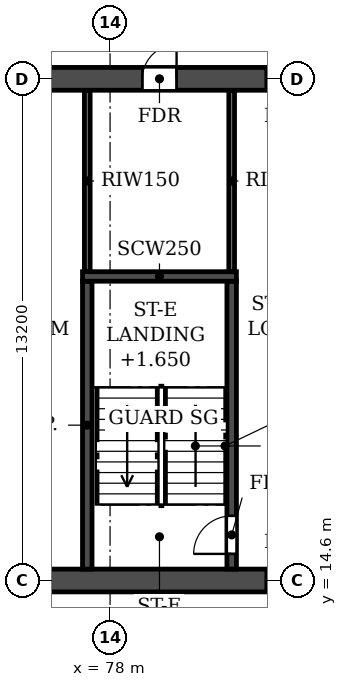
"""IFC4 building model, lengths in metres.
Left out: names, types, materials, properties, quantities, classifications, styles, units other than length and angle.
Written with IfcOpenShell. Run it as: python <this file> out.ifc"""

import sys

from ifc_helpers import new_model, si_unit, direction, frame, frame_2d, origin, place, context, subcontext, project, spatial, rectangle, extrude, element, fill, save


model = new_model("IFC4")
c1 = context("Model", 3, precision=1e-05, world=origin(), true_north=direction((0.0, 1.0)))
c2 = subcontext(c1, "Body", "Model", "MODEL_VIEW")
j1 = project(units=[si_unit("LENGTHUNIT", "METRE"), si_unit("PLANEANGLEUNIT", "RADIAN")], contexts=[c1])
p1 = place(None, origin())
s1 = spatial("IfcSite", under=j1, at=p1, CompositionType="ELEMENT")
p2 = place(p1, origin())
s2 = spatial("IfcBuilding", under=s1, at=p2, CompositionType="ELEMENT")
p3 = place(p2, frame((0.0, 0.0, 63.0)))
s3 = spatial("IfcBuildingStorey", under=s2, at=p3, CompositionType="ELEMENT", Elevation=63.0)
p4 = place(p3, frame((8.6, 14.6, 0.0), z_axis=(0.0, 0.0, 1.0), x_axis=(1.0, 0.0, 0.0)))
e1 = element("IfcWall", 1, at=p4, inside=s3, PredefinedType="SOLIDWALL", context=c2, shape_type="SweptSolid", body=[
    extrude(rectangle(XDim=84.8, YDim=0.6, at=frame_2d((42.4, 0.0))), origin(), (0.0, 0.0, 1.0), 2.95),
])
p5 = place(p4, frame((1.35, 0.0, 0.0)))
e2 = element("IfcOpeningElement", 2, at=p5, cuts=e1, PredefinedType="OPENING", context=c2, shape_type="SweptSolid", body=[
    extrude(rectangle(XDim=1.0, YDim=2.1, at=frame_2d((0.5, 1.05))), frame((0.0, 0.31, 0.0), z_axis=(0.0, -1.0, 0.0), x_axis=(1.0, 0.0, 0.0)), (0.0, 0.0, 1.0), 0.62),
])
p6 = place(p4, frame((6.05, 0.0, 0.0)))
e3 = element("IfcOpeningElement", 3, at=p6, cuts=e1, PredefinedType="OPENING", context=c2, shape_type="SweptSolid", body=[
    extrude(rectangle(XDim=1.0, YDim=2.1, at=frame_2d((0.5, 1.05))), frame((0.0, 0.31, 0.0), z_axis=(0.0, -1.0, 0.0), x_axis=(1.0, 0.0, 0.0)), (0.0, 0.0, 1.0), 0.62),
])
p7 = place(p4, frame((10.3, 0.0, 0.0)))
e4 = element("IfcOpeningElement", 4, at=p7, cuts=e1, PredefinedType="OPENING", context=c2, shape_type="SweptSolid", body=[
    extrude(rectangle(XDim=1.0, YDim=2.1, at=frame_2d((0.5, 1.05))), frame((0.0, 0.31, 0.0), z_axis=(0.0, -1.0, 0.0), x_axis=(1.0, 0.0, 0.0)), (0.0, 0.0, 1.0), 0.62),
])
p8 = place(p4, frame((18.2, 0.0, 0.0)))
e5 = element("IfcOpeningElement", 5, at=p8, cuts=e1, PredefinedType="OPENING", context=c2, shape_type="SweptSolid", body=[
    extrude(rectangle(XDim=1.0, YDim=2.1, at=frame_2d((0.5, 1.05))), frame((0.0, 0.31, 0.0), z_axis=(0.0, -1.0, 0.0), x_axis=(1.0, 0.0, 0.0)), (0.0, 0.0, 1.0), 0.62),
])
p9 = place(p4, frame((22.8, 0.0, 0.0)))
e6 = element("IfcOpeningElement", 6, at=p9, cuts=e1, PredefinedType="OPENING", context=c2, shape_type="SweptSolid", body=[
    extrude(rectangle(XDim=1.0, YDim=2.1, at=frame_2d((0.5, 1.05))), frame((0.0, 0.31, 0.0), z_axis=(0.0, -1.0, 0.0), x_axis=(1.0, 0.0, 0.0)), (0.0, 0.0, 1.0), 0.62),
])
p10 = place(p4, frame((35.4, 0.0, 0.0)))
e7 = element("IfcOpeningElement", 7, at=p10, cuts=e1, PredefinedType="OPENING", context=c2, shape_type="SweptSolid", body=[
    extrude(rectangle(XDim=1.0, YDim=2.1, at=frame_2d((0.5, 1.05))), frame((0.0, 0.31, 0.0), z_axis=(0.0, -1.0, 0.0), x_axis=(1.0, 0.0, 0.0)), (0.0, 0.0, 1.0), 0.62),
])
p11 = place(p4, frame((39.3, 0.0, 0.0)))
e8 = element("IfcOpeningElement", 8, at=p11, cuts=e1, PredefinedType="OPENING", context=c2, shape_type="SweptSolid", body=[
    extrude(rectangle(XDim=1.0, YDim=2.1, at=frame_2d((0.5, 1.05))), frame((0.0, 0.31, 0.0), z_axis=(0.0, -1.0, 0.0), x_axis=(1.0, 0.0, 0.0)), (0.0, 0.0, 1.0), 0.62),
])
p12 = place(p4, frame((41.9, 0.0, 0.0)))
e9 = element("IfcOpeningElement", 9, at=p12, cuts=e1, PredefinedType="OPENING", context=c2, shape_type="SweptSolid", body=[
    extrude(rectangle(XDim=1.0, YDim=2.1, at=frame_2d((0.5, 1.05))), frame((0.0, 0.31, 0.0), z_axis=(0.0, -1.0, 0.0), x_axis=(1.0, 0.0, 0.0)), (0.0, 0.0, 1.0), 0.62),
])
p13 = place(p4, frame((47.1, 0.0, 0.0)))
e10 = element("IfcOpeningElement", 10, at=p13, cuts=e1, PredefinedType="OPENING", context=c2, shape_type="SweptSolid", body=[
    extrude(rectangle(XDim=1.0, YDim=2.1, at=frame_2d((0.5, 1.05))), frame((0.0, 0.31, 0.0), z_axis=(0.0, -1.0, 0.0), x_axis=(1.0, 0.0, 0.0)), (0.0, 0.0, 1.0), 0.62),
])
p14 = place(p4, frame((61.0, 0.0, 0.0)))
e11 = element("IfcOpeningElement", 11, at=p14, cuts=e1, PredefinedType="OPENING", context=c2, shape_type="SweptSolid", body=[
    extrude(rectangle(XDim=1.0, YDim=2.1, at=frame_2d((0.5, 1.05))), frame((0.0, 0.31, 0.0), z_axis=(0.0, -1.0, 0.0), x_axis=(1.0, 0.0, 0.0)), (0.0, 0.0, 1.0), 0.62),
])
p15 = place(p4, frame((65.6, 0.0, 0.0)))
e12 = element("IfcOpeningElement", 12, at=p15, cuts=e1, PredefinedType="OPENING", context=c2, shape_type="SweptSolid", body=[
    extrude(rectangle(XDim=1.0, YDim=2.1, at=frame_2d((0.5, 1.05))), frame((0.0, 0.31, 0.0), z_axis=(0.0, -1.0, 0.0), x_axis=(1.0, 0.0, 0.0)), (0.0, 0.0, 1.0), 0.62),
])
p16 = place(p4, frame((73.5, 0.0, 0.0)))
e13 = element("IfcOpeningElement", 13, at=p16, cuts=e1, PredefinedType="OPENING", context=c2, shape_type="SweptSolid", body=[
    extrude(rectangle(XDim=1.0, YDim=2.1, at=frame_2d((0.5, 1.05))), frame((0.0, 0.31, 0.0), z_axis=(0.0, -1.0, 0.0), x_axis=(1.0, 0.0, 0.0)), (0.0, 0.0, 1.0), 0.62),
])
p17 = place(p4, frame((77.9, 0.0, 0.0)))
e14 = element("IfcOpeningElement", 14, at=p17, cuts=e1, PredefinedType="OPENING", context=c2, shape_type="SweptSolid", body=[
    extrude(rectangle(XDim=1.0, YDim=2.1, at=frame_2d((0.5, 1.05))), frame((0.0, 0.31, 0.0), z_axis=(0.0, -1.0, 0.0), x_axis=(1.0, 0.0, 0.0)), (0.0, 0.0, 1.0), 0.62),
])
p18 = place(p4, frame((82.6, 0.0, 0.0)))
e15 = element("IfcOpeningElement", 15, at=p18, cuts=e1, PredefinedType="OPENING", context=c2, shape_type="SweptSolid", body=[
    extrude(rectangle(XDim=1.0, YDim=2.1, at=frame_2d((0.5, 1.05))), frame((0.0, 0.31, 0.0), z_axis=(0.0, -1.0, 0.0), x_axis=(1.0, 0.0, 0.0)), (0.0, 0.0, 1.0), 0.62),
])
p19 = place(p3, frame((8.6, 27.8, 0.0), z_axis=(0.0, 0.0, 1.0), x_axis=(1.0, 0.0, 0.0)))
e16 = element("IfcWall", 16, at=p19, inside=s3, PredefinedType="SOLIDWALL", context=c2, shape_type="SweptSolid", body=[
    extrude(rectangle(XDim=84.8, YDim=0.6, at=frame_2d((42.4, 0.0))), origin(), (0.0, 0.0, 1.0), 2.95),
])
p20 = place(p19, frame((1.2, 0.0, 0.0)))
e17 = element("IfcOpeningElement", 17, at=p20, cuts=e16, PredefinedType="OPENING", context=c2, shape_type="SweptSolid", body=[
    extrude(rectangle(XDim=1.0, YDim=2.1, at=frame_2d((0.5, 1.05))), frame((0.0, 0.31, 0.0), z_axis=(0.0, -1.0, 0.0), x_axis=(1.0, 0.0, 0.0)), (0.0, 0.0, 1.0), 0.62),
])
p21 = place(p19, frame((5.9, 0.0, 0.0)))
e18 = element("IfcOpeningElement", 18, at=p21, cuts=e16, PredefinedType="OPENING", context=c2, shape_type="SweptSolid", body=[
    extrude(rectangle(XDim=1.0, YDim=2.1, at=frame_2d((0.5, 1.05))), frame((0.0, 0.31, 0.0), z_axis=(0.0, -1.0, 0.0), x_axis=(1.0, 0.0, 0.0)), (0.0, 0.0, 1.0), 0.62),
])
p22 = place(p19, frame((10.3, 0.0, 0.0)))
e19 = element("IfcOpeningElement", 19, at=p22, cuts=e16, PredefinedType="OPENING", context=c2, shape_type="SweptSolid", body=[
    extrude(rectangle(XDim=1.0, YDim=2.1, at=frame_2d((0.5, 1.05))), frame((0.0, 0.31, 0.0), z_axis=(0.0, -1.0, 0.0), x_axis=(1.0, 0.0, 0.0)), (0.0, 0.0, 1.0), 0.62),
])
p23 = place(p19, frame((13.65, 0.0, 0.0)))
e20 = element("IfcOpeningElement", 20, at=p23, cuts=e16, PredefinedType="OPENING", context=c2, shape_type="SweptSolid", body=[
    extrude(rectangle(XDim=0.9, YDim=2.1, at=frame_2d((0.45, 1.05))), frame((0.0, 0.31, 0.0), z_axis=(0.0, -1.0, 0.0), x_axis=(1.0, 0.0, 0.0)), (0.0, 0.0, 1.0), 0.62),
])
p24 = place(p19, frame((22.85, 0.0, 0.0)))
e21 = element("IfcOpeningElement", 21, at=p24, cuts=e16, PredefinedType="OPENING", context=c2, shape_type="SweptSolid", body=[
    extrude(rectangle(XDim=0.9, YDim=2.1, at=frame_2d((0.45, 1.05))), frame((0.0, 0.31, 0.0), z_axis=(0.0, -1.0, 0.0), x_axis=(1.0, 0.0, 0.0)), (0.0, 0.0, 1.0), 0.62),
])
p25 = place(p19, frame((27.3, 0.0, 0.0)))
e22 = element("IfcOpeningElement", 22, at=p25, cuts=e16, PredefinedType="OPENING", context=c2, shape_type="SweptSolid", body=[
    extrude(rectangle(XDim=1.0, YDim=2.1, at=frame_2d((0.5, 1.05))), frame((0.0, 0.31, 0.0), z_axis=(0.0, -1.0, 0.0), x_axis=(1.0, 0.0, 0.0)), (0.0, 0.0, 1.0), 0.62),
])
p26 = place(p19, frame((32.5, 0.0, 0.0)))
e23 = element("IfcOpeningElement", 23, at=p26, cuts=e16, PredefinedType="OPENING", context=c2, shape_type="SweptSolid", body=[
    extrude(rectangle(XDim=1.0, YDim=2.1, at=frame_2d((0.5, 1.05))), frame((0.0, 0.31, 0.0), z_axis=(0.0, -1.0, 0.0), x_axis=(1.0, 0.0, 0.0)), (0.0, 0.0, 1.0), 0.62),
])
p27 = place(p19, frame((39.0, 0.0, 0.0)))
e24 = element("IfcOpeningElement", 24, at=p27, cuts=e16, PredefinedType="OPENING", context=c2, shape_type="SweptSolid", body=[
    extrude(rectangle(XDim=1.0, YDim=2.1, at=frame_2d((0.5, 1.05))), frame((0.0, 0.31, 0.0), z_axis=(0.0, -1.0, 0.0), x_axis=(1.0, 0.0, 0.0)), (0.0, 0.0, 1.0), 0.62),
])
p28 = place(p19, frame((41.9, 0.0, 0.0)))
e25 = element("IfcOpeningElement", 25, at=p28, cuts=e16, PredefinedType="OPENING", context=c2, shape_type="SweptSolid", body=[
    extrude(rectangle(XDim=1.0, YDim=2.1, at=frame_2d((0.5, 1.05))), frame((0.0, 0.31, 0.0), z_axis=(0.0, -1.0, 0.0), x_axis=(1.0, 0.0, 0.0)), (0.0, 0.0, 1.0), 0.62),
])
p29 = place(p19, frame((47.4, 0.0, 0.0)))
e26 = element("IfcOpeningElement", 26, at=p29, cuts=e16, PredefinedType="OPENING", context=c2, shape_type="SweptSolid", body=[
    extrude(rectangle(XDim=1.0, YDim=2.1, at=frame_2d((0.5, 1.05))), frame((0.0, 0.31, 0.0), z_axis=(0.0, -1.0, 0.0), x_axis=(1.0, 0.0, 0.0)), (0.0, 0.0, 1.0), 0.62),
])
p30 = place(p19, frame((53.9, 0.0, 0.0)))
e27 = element("IfcOpeningElement", 27, at=p30, cuts=e16, PredefinedType="OPENING", context=c2, shape_type="SweptSolid", body=[
    extrude(rectangle(XDim=1.0, YDim=2.1, at=frame_2d((0.5, 1.05))), frame((0.0, 0.31, 0.0), z_axis=(0.0, -1.0, 0.0), x_axis=(1.0, 0.0, 0.0)), (0.0, 0.0, 1.0), 0.62),
])
p31 = place(p19, frame((57.8, 0.0, 0.0)))
e28 = element("IfcOpeningElement", 28, at=p31, cuts=e16, PredefinedType="OPENING", context=c2, shape_type="SweptSolid", body=[
    extrude(rectangle(XDim=1.0, YDim=2.1, at=frame_2d((0.5, 1.05))), frame((0.0, 0.31, 0.0), z_axis=(0.0, -1.0, 0.0), x_axis=(1.0, 0.0, 0.0)), (0.0, 0.0, 1.0), 0.62),
])
p32 = place(p19, frame((61.05, 0.0, 0.0)))
e29 = element("IfcOpeningElement", 29, at=p32, cuts=e16, PredefinedType="OPENING", context=c2, shape_type="SweptSolid", body=[
    extrude(rectangle(XDim=0.9, YDim=2.1, at=frame_2d((0.45, 1.05))), frame((0.0, 0.31, 0.0), z_axis=(0.0, -1.0, 0.0), x_axis=(1.0, 0.0, 0.0)), (0.0, 0.0, 1.0), 0.62),
])
p33 = place(p19, frame((70.25, 0.0, 0.0)))
e30 = element("IfcOpeningElement", 30, at=p33, cuts=e16, PredefinedType="OPENING", context=c2, shape_type="SweptSolid", body=[
    extrude(rectangle(XDim=0.9, YDim=2.1, at=frame_2d((0.45, 1.05))), frame((0.0, 0.31, 0.0), z_axis=(0.0, -1.0, 0.0), x_axis=(1.0, 0.0, 0.0)), (0.0, 0.0, 1.0), 0.62),
])
p34 = place(p19, frame((73.5, 0.0, 0.0)))
e31 = element("IfcOpeningElement", 31, at=p34, cuts=e16, PredefinedType="OPENING", context=c2, shape_type="SweptSolid", body=[
    extrude(rectangle(XDim=1.0, YDim=2.1, at=frame_2d((0.5, 1.05))), frame((0.0, 0.31, 0.0), z_axis=(0.0, -1.0, 0.0), x_axis=(1.0, 0.0, 0.0)), (0.0, 0.0, 1.0), 0.62),
])
p35 = place(p19, frame((77.75, 0.0, 0.0)))
e32 = element("IfcOpeningElement", 32, at=p35, cuts=e16, PredefinedType="OPENING", context=c2, shape_type="SweptSolid", body=[
    extrude(rectangle(XDim=1.0, YDim=2.1, at=frame_2d((0.5, 1.05))), frame((0.0, 0.31, 0.0), z_axis=(0.0, -1.0, 0.0), x_axis=(1.0, 0.0, 0.0)), (0.0, 0.0, 1.0), 0.62),
])
p36 = place(p19, frame((82.45, 0.0, 0.0)))
e33 = element("IfcOpeningElement", 33, at=p36, cuts=e16, PredefinedType="OPENING", context=c2, shape_type="SweptSolid", body=[
    extrude(rectangle(XDim=1.0, YDim=2.1, at=frame_2d((0.5, 1.05))), frame((0.0, 0.31, 0.0), z_axis=(0.0, -1.0, 0.0), x_axis=(1.0, 0.0, 0.0)), (0.0, 0.0, 1.0), 0.62),
])
p37 = place(p3, frame((77.4, 14.9, 0.0), z_axis=(0.0, 0.0, 1.0), x_axis=(0.0, 1.0, 0.0)))
e34 = element("IfcWall", 34, at=p37, inside=s3, PredefinedType="SOLIDWALL", context=c2, shape_type="SweptSolid", body=[
    extrude(rectangle(XDim=7.575, YDim=0.25, at=frame_2d((3.788, 0.0))), origin(), (0.0, 0.0, 1.0), 2.95),
])
p38 = place(p3, frame((81.2, 14.9, 0.0), z_axis=(0.0, 0.0, 1.0), x_axis=(0.0, 1.0, 0.0)))
e35 = element("IfcWall", 35, at=p38, inside=s3, PredefinedType="SOLIDWALL", context=c2, shape_type="SweptSolid", body=[
    extrude(rectangle(XDim=7.575, YDim=0.25, at=frame_2d((3.788, 0.0))), origin(), (0.0, 0.0, 1.0), 2.95),
])
p39 = place(p38, frame((0.4, 0.0, 0.0)))
e36 = element("IfcOpeningElement", 36, at=p39, cuts=e35, PredefinedType="OPENING", context=c2, shape_type="SweptSolid", body=[
    extrude(rectangle(XDim=1.0, YDim=2.1, at=frame_2d((0.5, 1.05))), frame((0.0, 0.135, 0.0), z_axis=(0.0, -1.0, 0.0), x_axis=(1.0, 0.0, 0.0)), (0.0, 0.0, 1.0), 0.27),
])
p40 = place(p3, frame((77.275, 22.6, 0.0), z_axis=(0.0, 0.0, 1.0), x_axis=(1.0, 0.0, 0.0)))
e37 = element("IfcWall", 37, at=p40, inside=s3, PredefinedType="SOLIDWALL", context=c2, shape_type="SweptSolid", body=[
    extrude(rectangle(XDim=4.05, YDim=0.25, at=frame_2d((2.025, 0.0))), origin(), (0.0, 0.0, 1.0), 2.95),
])
for number, where, z_axis, x_axis in (
    (38, (77.4, 22.735, 0.0), (0.0, 0.0, 1.0), (0.0, 1.0, 0.0)),
    (39, (81.2, 22.735, 0.0), (0.0, 0.0, 1.0), (0.0, 1.0, 0.0)),
):
    element("IfcWall", number, at=place(p3, frame(where, z_axis=z_axis, x_axis=x_axis)), inside=s3, PredefinedType="PARTITIONING", context=c2, shape_type="SweptSolid", body=[
        extrude(rectangle(XDim=4.755, YDim=0.15, at=frame_2d((2.377, 0.0))), origin(), (0.0, 0.0, 1.0), 2.95),
    ])
p41 = place(p33, origin())
e40 = element("IfcDoor", 40, at=p41, inside=s3, OperationType="SINGLE_SWING_RIGHT", PredefinedType="DOOR", context=c2, shape_type="SweptSolid", body=[
    extrude(rectangle(XDim=0.9, YDim=2.1, at=frame_2d((0.45, 1.05))), frame((0.0, 0.025, 0.0), z_axis=(0.0, -1.0, 0.0), x_axis=(1.0, 0.0, 0.0)), (0.0, 0.0, 1.0), 0.05),
])
fill(e30, e40)
p42 = place(p34, origin())
e41 = element("IfcDoor", 41, at=p42, inside=s3, OperationType="SINGLE_SWING_RIGHT", PredefinedType="DOOR", context=c2, shape_type="SweptSolid", body=[
    extrude(rectangle(XDim=1.0, YDim=2.1, at=frame_2d((0.5, 1.05))), frame((0.0, 0.025, 0.0), z_axis=(0.0, -1.0, 0.0), x_axis=(1.0, 0.0, 0.0)), (0.0, 0.0, 1.0), 0.05),
])
fill(e31, e41)
p43 = place(p16, frame((1.0, 0.0, 0.0), z_axis=(0.0, 0.0, 1.0), x_axis=(-1.0, 0.0, 0.0)))
e42 = element("IfcDoor", 42, at=p43, inside=s3, OperationType="SINGLE_SWING_LEFT", PredefinedType="DOOR", context=c2, shape_type="SweptSolid", body=[
    extrude(rectangle(XDim=1.0, YDim=2.1, at=frame_2d((0.5, 1.05))), frame((0.0, 0.025, 0.0), z_axis=(0.0, -1.0, 0.0), x_axis=(1.0, 0.0, 0.0)), (0.0, 0.0, 1.0), 0.05),
])
fill(e13, e42)
p44 = place(p39, origin())
e43 = element("IfcDoor", 43, at=p44, inside=s3, OperationType="SINGLE_SWING_LEFT", PredefinedType="DOOR", context=c2, shape_type="SweptSolid", body=[
    extrude(rectangle(XDim=1.0, YDim=2.1, at=frame_2d((0.5, 1.05))), frame((0.0, 0.025, 0.0), z_axis=(0.0, -1.0, 0.0), x_axis=(1.0, 0.0, 0.0)), (0.0, 0.0, 1.0), 0.05),
])
fill(e36, e43)
save(model, sys.argv[1])
